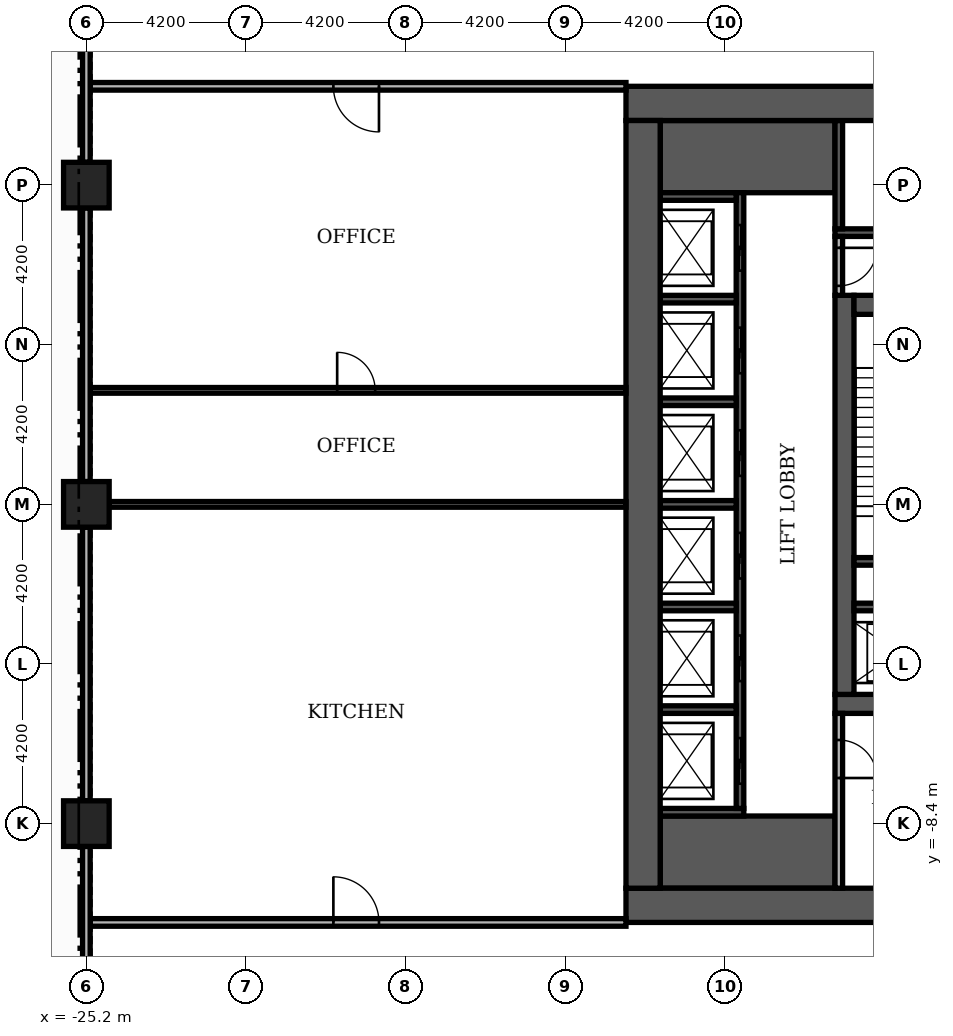
"""IFC4 building model, lengths in metres.
Left out: names, types, materials, properties, quantities, classifications, styles, units other than length and angle.
Written with IfcOpenShell. Run it as: python <this file> out.ifc"""

import sys

from ifc_helpers import new_model, si_unit, direction, frame, frame_2d, origin, origin_2d, place, context, subcontext, project, spatial, rectangle, extrude, element, fill, save


model = new_model("IFC4")
c1 = context("Model", 3, precision=1e-05, world=origin(), true_north=direction((0.0, 1.0)))
c2 = subcontext(c1, "Body", "Model", "MODEL_VIEW")
j1 = project(units=[si_unit("LENGTHUNIT", "METRE"), si_unit("PLANEANGLEUNIT", "RADIAN")], contexts=[c1])
p1 = place(None, origin())
s1 = spatial("IfcSite", under=j1, at=p1, CompositionType="ELEMENT")
p2 = place(p1, origin())
s2 = spatial("IfcBuilding", under=s1, at=p2, CompositionType="ELEMENT")
p3 = place(p2, frame((0.0, 0.0, 16.8)))
s3 = spatial("IfcBuildingStorey", under=s2, at=p3, CompositionType="ELEMENT", Elevation=16.8)
p4 = place(p3, frame((-5.5, -5.25, 0.0), z_axis=(0.0, 0.0, 1.0), x_axis=(1.0, 0.0, 0.0)))
e1 = element("IfcWall", 1, at=p4, inside=s3, PredefinedType="SHEAR", context=c2, shape_type="SweptSolid", body=[
    extrude(rectangle(XDim=11.0, YDim=0.5, at=frame_2d((5.5, 0.0))), origin(), (0.0, 0.0, 1.0), 4.98),
])
p5 = place(p4, frame((4.9, 0.0, 0.0)))
e2 = element("IfcOpeningElement", 2, at=p5, cuts=e1, PredefinedType="OPENING", context=c2, shape_type="SweptSolid", body=[
    extrude(rectangle(XDim=1.2, YDim=2.1, at=frame_2d((0.6, 1.05))), frame((0.0, 0.26, 0.0), z_axis=(0.0, -1.0, 0.0), x_axis=(1.0, 0.0, 0.0)), (0.0, 0.0, 1.0), 0.52),
])
p6 = place(p3, frame((-5.25, -5.0, 0.0), z_axis=(0.0, 0.0, 1.0), x_axis=(0.0, 1.0, 0.0)))
e3 = element("IfcWall", 3, at=p6, inside=s3, PredefinedType="SHEAR", context=c2, shape_type="SweptSolid", body=[
    extrude(rectangle(XDim=10.5, YDim=0.5, at=frame_2d((5.25, 0.0))), origin(), (0.0, 0.0, 1.0), 4.98),
])
p7 = place(p3, frame((-5.0, 5.25, 0.0), z_axis=(0.0, 0.0, 1.0), x_axis=(1.0, 0.0, 0.0)))
e4 = element("IfcWall", 4, at=p7, inside=s3, PredefinedType="SHEAR", context=c2, shape_type="SweptSolid", body=[
    extrude(rectangle(XDim=10.0, YDim=0.5, at=frame_2d((5.0, 0.0))), origin(), (0.0, 0.0, 1.0), 4.98),
])
p8 = place(p7, frame((4.4, 0.0, 0.0)))
e5 = element("IfcOpeningElement", 5, at=p8, cuts=e4, PredefinedType="OPENING", context=c2, shape_type="SweptSolid", body=[
    extrude(rectangle(XDim=1.2, YDim=2.1, at=frame_2d((0.6, 1.05))), frame((0.0, 0.26, 0.0), z_axis=(0.0, -1.0, 0.0), x_axis=(1.0, 0.0, 0.0)), (0.0, 0.0, 1.0), 0.52),
])
for number, where, z_axis, x_axis in (
    (6, (-10.1, -9.15, 0.0), (0.0, 0.0, 1.0), (1.0, 0.0, 0.0)),
    (7, (-10.1, 9.15, 0.0), (0.0, 0.0, 1.0), (1.0, 0.0, 0.0)),
):
    element("IfcWall", number, at=place(p3, frame(where, z_axis=z_axis, x_axis=x_axis)), inside=s3, PredefinedType="SHEAR", context=c2, shape_type="SweptSolid", body=[
        extrude(rectangle(XDim=4.6, YDim=1.9, at=frame_2d((2.3, 0.0))), origin(), (0.0, 0.0, 1.0), 4.98),
    ])
p9 = place(p3, frame((-5.0, -1.5, 0.0), z_axis=(0.0, 0.0, 1.0), x_axis=(1.0, 0.0, 0.0)))
e8 = element("IfcWall", 8, at=p9, inside=s3, PredefinedType="SHEAR", context=c2, shape_type="SweptSolid", body=[
    extrude(rectangle(XDim=3.05, YDim=0.2, at=frame_2d((1.525, 0.0))), origin(), (0.0, 0.0, 1.0), 4.98),
])
p10 = place(p3, frame((-5.5, 7.15, 0.0), z_axis=(0.0, 0.0, 1.0), x_axis=(1.0, 0.0, 0.0)))
e9 = element("IfcWall", 9, at=p10, inside=s3, PredefinedType="SHEAR", context=c2, shape_type="SweptSolid", body=[
    extrude(rectangle(XDim=6.8, YDim=0.2, at=frame_2d((3.4, 0.0))), origin(), (0.0, 0.0, 1.0), 4.98),
])
p11 = place(p3, frame((-5.4, 7.25, 0.0), z_axis=(0.0, 0.0, 1.0), x_axis=(0.0, 1.0, 0.0)))
e10 = element("IfcWall", 10, at=p11, inside=s3, PredefinedType="SHEAR", context=c2, shape_type="SweptSolid", body=[
    extrude(rectangle(XDim=2.85, YDim=0.2, at=frame_2d((1.425, 0.0))), origin(), (0.0, 0.0, 1.0), 4.98),
])
p12 = place(p3, frame((-10.1, -8.1, 0.0), z_axis=(0.0, 0.0, 1.0), x_axis=(1.0, 0.0, 0.0)))
e11 = element("IfcWall", 11, at=p12, inside=s3, PredefinedType="SHEAR", context=c2, shape_type="SweptSolid", body=[
    extrude(rectangle(XDim=2.2, YDim=0.2, at=frame_2d((1.1, 0.0))), origin(), (0.0, 0.0, 1.0), 4.98),
])
p13 = place(p3, frame((-8.0, -8.0, 0.0), z_axis=(0.0, 0.0, 1.0), x_axis=(0.0, 1.0, 0.0)))
e12 = element("IfcWall", 12, at=p13, inside=s3, PredefinedType="SHEAR", context=c2, shape_type="SweptSolid", body=[
    extrude(rectangle(XDim=16.2, YDim=0.2, at=frame_2d((8.1, 0.0))), origin(), (0.0, 0.0, 1.0), 4.98),
])
p14 = place(p13, frame((0.65, 0.0, 0.0)))
e13 = element("IfcOpeningElement", 13, at=p14, cuts=e12, PredefinedType="OPENING", context=c2, shape_type="SweptSolid", body=[
    extrude(rectangle(XDim=1.2, YDim=2.1, at=frame_2d((0.6, 1.05))), frame((0.0, 0.11, 0.0), z_axis=(0.0, -1.0, 0.0), x_axis=(1.0, 0.0, 0.0)), (0.0, 0.0, 1.0), 0.22),
])
p15 = place(p13, frame((3.35, 0.0, 0.0)))
e14 = element("IfcOpeningElement", 14, at=p15, cuts=e12, PredefinedType="OPENING", context=c2, shape_type="SweptSolid", body=[
    extrude(rectangle(XDim=1.2, YDim=2.1, at=frame_2d((0.6, 1.05))), frame((0.0, 0.11, 0.0), z_axis=(0.0, -1.0, 0.0), x_axis=(1.0, 0.0, 0.0)), (0.0, 0.0, 1.0), 0.22),
])
p16 = place(p13, frame((6.05, 0.0, 0.0)))
e15 = element("IfcOpeningElement", 15, at=p16, cuts=e12, PredefinedType="OPENING", context=c2, shape_type="SweptSolid", body=[
    extrude(rectangle(XDim=1.2, YDim=2.1, at=frame_2d((0.6, 1.05))), frame((0.0, 0.11, 0.0), z_axis=(0.0, -1.0, 0.0), x_axis=(1.0, 0.0, 0.0)), (0.0, 0.0, 1.0), 0.22),
])
p17 = place(p13, frame((8.75, 0.0, 0.0)))
e16 = element("IfcOpeningElement", 16, at=p17, cuts=e12, PredefinedType="OPENING", context=c2, shape_type="SweptSolid", body=[
    extrude(rectangle(XDim=1.2, YDim=2.1, at=frame_2d((0.6, 1.05))), frame((0.0, 0.11, 0.0), z_axis=(0.0, -1.0, 0.0), x_axis=(1.0, 0.0, 0.0)), (0.0, 0.0, 1.0), 0.22),
])
p18 = place(p13, frame((11.45, 0.0, 0.0)))
e17 = element("IfcOpeningElement", 17, at=p18, cuts=e12, PredefinedType="OPENING", context=c2, shape_type="SweptSolid", body=[
    extrude(rectangle(XDim=1.2, YDim=2.1, at=frame_2d((0.6, 1.05))), frame((0.0, 0.11, 0.0), z_axis=(0.0, -1.0, 0.0), x_axis=(1.0, 0.0, 0.0)), (0.0, 0.0, 1.0), 0.22),
])
p19 = place(p13, frame((14.15, 0.0, 0.0)))
e18 = element("IfcOpeningElement", 18, at=p19, cuts=e12, PredefinedType="OPENING", context=c2, shape_type="SweptSolid", body=[
    extrude(rectangle(XDim=1.2, YDim=2.1, at=frame_2d((0.6, 1.05))), frame((0.0, 0.11, 0.0), z_axis=(0.0, -1.0, 0.0), x_axis=(1.0, 0.0, 0.0)), (0.0, 0.0, 1.0), 0.22),
])
for number, where, z_axis, x_axis in (
    (19, (-10.1, -5.4, 0.0), (0.0, 0.0, 1.0), (1.0, 0.0, 0.0)),
    (20, (-10.1, -2.7, 0.0), (0.0, 0.0, 1.0), (1.0, 0.0, 0.0)),
):
    element("IfcWall", number, at=place(p3, frame(where, z_axis=z_axis, x_axis=x_axis)), inside=s3, PredefinedType="SHEAR", context=c2, shape_type="SweptSolid", body=[
        extrude(rectangle(XDim=2.0, YDim=0.2, at=frame_2d((1.0, 0.0))), origin(), (0.0, 0.0, 1.0), 4.98),
    ])
p20 = place(p3, frame((-5.0, -2.7, 0.0), z_axis=(0.0, 0.0, 1.0), x_axis=(1.0, 0.0, 0.0)))
e21 = element("IfcWall", 21, at=p20, inside=s3, PredefinedType="SHEAR", context=c2, shape_type="SweptSolid", body=[
    extrude(rectangle(XDim=2.85, YDim=0.2, at=frame_2d((1.425, 0.0))), origin(), (0.0, 0.0, 1.0), 4.98),
])
for number, where, z_axis, x_axis in (
    (22, (-10.1, 0.0, 0.0), (0.0, 0.0, 1.0), (1.0, 0.0, 0.0)),
    (23, (-10.1, 2.7, 0.0), (0.0, 0.0, 1.0), (1.0, 0.0, 0.0)),
    (24, (-10.1, 5.4, 0.0), (0.0, 0.0, 1.0), (1.0, 0.0, 0.0)),
    (25, (-10.1, 8.1, 0.0), (0.0, 0.0, 1.0), (1.0, 0.0, 0.0)),
):
    element("IfcWall", number, at=place(p3, frame(where, z_axis=z_axis, x_axis=x_axis)), inside=s3, PredefinedType="SHEAR", context=c2, shape_type="SweptSolid", body=[
        extrude(rectangle(XDim=2.0, YDim=0.2, at=frame_2d((1.0, 0.0))), origin(), (0.0, 0.0, 1.0), 4.98),
    ])
p21 = place(p3, frame((-11.0, -10.55, 0.0), z_axis=(0.0, 0.0, 1.0), x_axis=(1.0, 0.0, 0.0)))
e26 = element("IfcWall", 26, at=p21, inside=s3, PredefinedType="SHEAR", context=c2, shape_type="SweptSolid", body=[
    extrude(rectangle(XDim=22.0, YDim=0.9, at=frame_2d((11.0, 0.0))), origin(), (0.0, 0.0, 1.0), 4.98),
])
p22 = place(p21, frame((7.4, 0.0, 0.0)))
e27 = element("IfcOpeningElement", 27, at=p22, cuts=e26, PredefinedType="OPENING", context=c2, shape_type="SweptSolid", body=[
    extrude(rectangle(XDim=1.8, YDim=2.2, at=frame_2d((0.9, 1.1))), frame((0.0, 0.46, 0.0), z_axis=(0.0, -1.0, 0.0), x_axis=(1.0, 0.0, 0.0)), (0.0, 0.0, 1.0), 0.92),
])
p23 = place(p3, frame((-11.0, 10.55, 0.0), z_axis=(0.0, 0.0, 1.0), x_axis=(1.0, 0.0, 0.0)))
e28 = element("IfcWall", 28, at=p23, inside=s3, PredefinedType="SHEAR", context=c2, shape_type="SweptSolid", body=[
    extrude(rectangle(XDim=22.0, YDim=0.9, at=frame_2d((11.0, 0.0))), origin(), (0.0, 0.0, 1.0), 4.98),
])
p24 = place(p23, frame((13.3, 0.0, 0.0)))
e29 = element("IfcOpeningElement", 29, at=p24, cuts=e28, PredefinedType="OPENING", context=c2, shape_type="SweptSolid", body=[
    extrude(rectangle(XDim=1.8, YDim=2.2, at=frame_2d((0.9, 1.1))), frame((0.0, 0.46, 0.0), z_axis=(0.0, -1.0, 0.0), x_axis=(1.0, 0.0, 0.0)), (0.0, 0.0, 1.0), 0.92),
])
p25 = place(p3, frame((-10.55, -10.1, 0.0), z_axis=(0.0, 0.0, 1.0), x_axis=(0.0, 1.0, 0.0)))
e30 = element("IfcWall", 30, at=p25, inside=s3, PredefinedType="SHEAR", context=c2, shape_type="SweptSolid", body=[
    extrude(rectangle(XDim=20.2, YDim=0.9, at=frame_2d((10.1, 0.0))), origin(), (0.0, 0.0, 1.0), 4.98),
])
for number, where, z_axis, x_axis in (
    (31, (-25.2, 0.0, 0.0), (0.0, 0.0, 1.0), (1.0, 0.0, 0.0)),
    (32, (-25.2, -8.4, 0.0), (0.0, 0.0, 1.0), (1.0, 0.0, 0.0)),
    (33, (-25.2, 8.4, 0.0), (0.0, 0.0, 1.0), (1.0, 0.0, 0.0)),
):
    element("IfcColumn", number, at=place(p3, frame(where, z_axis=z_axis, x_axis=x_axis)), inside=s3, PredefinedType="COLUMN", context=c2, shape_type="SweptSolid", body=[
        extrude(rectangle(XDim=1.2, YDim=1.2, at=origin_2d()), origin(), (0.0, 0.0, 1.0), 5.4),
    ])
p26 = place(p3, frame((-5.4, -10.1, 0.0), z_axis=(0.0, 0.0, 1.0), x_axis=(0.0, 1.0, 0.0)))
e34 = element("IfcWall", 34, at=p26, inside=s3, PredefinedType="PARTITIONING", context=c2, shape_type="SweptSolid", body=[
    extrude(rectangle(XDim=4.6, YDim=0.2, at=frame_2d((2.3, 0.0))), origin(), (0.0, 0.0, 1.0), 4.98),
])
p27 = place(p26, frame((2.9, 0.0, 0.0)))
e35 = element("IfcOpeningElement", 35, at=p27, cuts=e34, PredefinedType="OPENING", context=c2, shape_type="SweptSolid", body=[
    extrude(rectangle(XDim=1.0, YDim=2.1, at=frame_2d((0.5, 1.05))), frame((0.0, 0.11, 0.0), z_axis=(0.0, -1.0, 0.0), x_axis=(1.0, 0.0, 0.0)), (0.0, 0.0, 1.0), 0.22),
])
p28 = place(p3, frame((-5.4, 5.5, 0.0), z_axis=(0.0, 0.0, 1.0), x_axis=(0.0, 1.0, 0.0)))
e36 = element("IfcWall", 36, at=p28, inside=s3, PredefinedType="PARTITIONING", context=c2, shape_type="SweptSolid", body=[
    extrude(rectangle(XDim=1.55, YDim=0.2, at=frame_2d((0.775, 0.0))), origin(), (0.0, 0.0, 1.0), 4.98),
])
p29 = place(p28, frame((0.25, 0.0, 0.0)))
e37 = element("IfcOpeningElement", 37, at=p29, cuts=e36, PredefinedType="OPENING", context=c2, shape_type="SweptSolid", body=[
    extrude(rectangle(XDim=1.0, YDim=2.1, at=frame_2d((0.5, 1.05))), frame((0.0, 0.11, 0.0), z_axis=(0.0, -1.0, 0.0), x_axis=(1.0, 0.0, 0.0)), (0.0, 0.0, 1.0), 0.22),
])
p30 = place(p3, frame((-25.1, -11.0, 0.0), z_axis=(0.0, 0.0, 1.0), x_axis=(1.0, 0.0, 0.0)))
e38 = element("IfcWall", 38, at=p30, inside=s3, PredefinedType="PARTITIONING", context=c2, shape_type="SweptSolid", body=[
    extrude(rectangle(XDim=14.1, YDim=0.2, at=frame_2d((7.05, 0.0))), origin(), (0.0, 0.0, 1.0), 4.98),
])
p31 = place(p30, frame((6.4, 0.0, 0.0)))
e39 = element("IfcOpeningElement", 39, at=p31, cuts=e38, PredefinedType="OPENING", context=c2, shape_type="SweptSolid", body=[
    extrude(rectangle(XDim=1.2, YDim=2.2, at=frame_2d((0.6, 1.1))), frame((0.0, 0.11, 0.0), z_axis=(0.0, -1.0, 0.0), x_axis=(1.0, 0.0, 0.0)), (0.0, 0.0, 1.0), 0.22),
])
p32 = place(p3, frame((-24.6, 0.0, 0.0), z_axis=(0.0, 0.0, 1.0), x_axis=(1.0, 0.0, 0.0)))
e40 = element("IfcWall", 40, at=p32, inside=s3, PredefinedType="PARTITIONING", context=c2, shape_type="SweptSolid", body=[
    extrude(rectangle(XDim=13.6, YDim=0.15, at=frame_2d((6.8, 0.0))), origin(), (0.0, 0.0, 1.0), 4.98),
])
p33 = place(p3, frame((-25.1, 3.0, 0.0), z_axis=(0.0, 0.0, 1.0), x_axis=(1.0, 0.0, 0.0)))
e41 = element("IfcWall", 41, at=p33, inside=s3, PredefinedType="PARTITIONING", context=c2, shape_type="SweptSolid", body=[
    extrude(rectangle(XDim=14.1, YDim=0.15, at=frame_2d((7.05, 0.0))), origin(), (0.0, 0.0, 1.0), 4.98),
])
p34 = place(p33, frame((6.5, 0.0, 0.0)))
e42 = element("IfcOpeningElement", 42, at=p34, cuts=e41, PredefinedType="OPENING", context=c2, shape_type="SweptSolid", body=[
    extrude(rectangle(XDim=1.0, YDim=2.1, at=frame_2d((0.5, 1.05))), frame((0.0, 0.085, 0.0), z_axis=(0.0, -1.0, 0.0), x_axis=(1.0, 0.0, 0.0)), (0.0, 0.0, 1.0), 0.17),
])
p35 = place(p3, frame((-25.1, 11.0, 0.0), z_axis=(0.0, 0.0, 1.0), x_axis=(1.0, 0.0, 0.0)))
e43 = element("IfcWall", 43, at=p35, inside=s3, PredefinedType="PARTITIONING", context=c2, shape_type="SweptSolid", body=[
    extrude(rectangle(XDim=14.1, YDim=0.2, at=frame_2d((7.05, 0.0))), origin(), (0.0, 0.0, 1.0), 4.98),
])
p36 = place(p35, frame((6.4, 0.0, 0.0)))
e44 = element("IfcOpeningElement", 44, at=p36, cuts=e43, PredefinedType="OPENING", context=c2, shape_type="SweptSolid", body=[
    extrude(rectangle(XDim=1.2, YDim=2.2, at=frame_2d((0.6, 1.1))), frame((0.0, 0.11, 0.0), z_axis=(0.0, -1.0, 0.0), x_axis=(1.0, 0.0, 0.0)), (0.0, 0.0, 1.0), 0.22),
])
p37 = place(p3, frame((-25.2, -16.2, 0.0), z_axis=(0.0, 0.0, 1.0), x_axis=(0.0, 1.0, 0.0)))
e45 = element("IfcWall", 45, at=p37, inside=s3, PredefinedType="PARTITIONING", context=c2, shape_type="SweptSolid", body=[
    extrude(rectangle(XDim=7.2, YDim=0.2, at=frame_2d((3.6, 0.0))), origin(), (0.0, 0.0, 1.0), 4.68),
])
p38 = place(p37, frame((1.5, 0.0, 0.0)))
e46 = element("IfcOpeningElement", 46, at=p38, cuts=e45, PredefinedType="OPENING", context=c2, shape_type="SweptSolid", body=[
    extrude(rectangle(XDim=1.8, YDim=2.2, at=frame_2d((0.9, 1.1))), frame((0.0, 0.11, 0.0), z_axis=(0.0, -1.0, 0.0), x_axis=(1.0, 0.0, 0.0)), (0.0, 0.0, 1.0), 0.22),
])
for number, where, z_axis, x_axis in (
    (47, (-25.2, -7.8, 0.0), (0.0, 0.0, 1.0), (0.0, 1.0, 0.0)),
    (48, (-25.2, 0.6, 0.0), (0.0, 0.0, 1.0), (0.0, 1.0, 0.0)),
):
    element("IfcWall", number, at=place(p3, frame(where, z_axis=z_axis, x_axis=x_axis)), inside=s3, PredefinedType="PARTITIONING", context=c2, shape_type="SweptSolid", body=[
        extrude(rectangle(XDim=7.2, YDim=0.2, at=frame_2d((3.6, 0.0))), origin(), (0.0, 0.0, 1.0), 4.68),
    ])
p39 = place(p3, frame((-25.2, 9.0, 0.0), z_axis=(0.0, 0.0, 1.0), x_axis=(0.0, 1.0, 0.0)))
e49 = element("IfcWall", 49, at=p39, inside=s3, PredefinedType="PARTITIONING", context=c2, shape_type="SweptSolid", body=[
    extrude(rectangle(XDim=7.2, YDim=0.2, at=frame_2d((3.6, 0.0))), origin(), (0.0, 0.0, 1.0), 4.68),
])
p40 = place(p39, frame((3.9, 0.0, 0.0)))
e50 = element("IfcOpeningElement", 50, at=p40, cuts=e49, PredefinedType="OPENING", context=c2, shape_type="SweptSolid", body=[
    extrude(rectangle(XDim=1.8, YDim=2.2, at=frame_2d((0.9, 1.1))), frame((0.0, 0.11, 0.0), z_axis=(0.0, -1.0, 0.0), x_axis=(1.0, 0.0, 0.0)), (0.0, 0.0, 1.0), 0.22),
])
p41 = place(p14, origin())
e51 = element("IfcDoor", 51, at=p41, inside=s3, OperationType="SLIDING_TO_LEFT", PredefinedType="DOOR", context=c2, shape_type="SweptSolid", body=[
    extrude(rectangle(XDim=1.2, YDim=2.1, at=frame_2d((0.6, 1.05))), frame((0.0, 0.025, 0.0), z_axis=(0.0, -1.0, 0.0), x_axis=(1.0, 0.0, 0.0)), (0.0, 0.0, 1.0), 0.05),
])
fill(e13, e51)
p42 = place(p15, origin())
e52 = element("IfcDoor", 52, at=p42, inside=s3, OperationType="SLIDING_TO_LEFT", PredefinedType="DOOR", context=c2, shape_type="SweptSolid", body=[
    extrude(rectangle(XDim=1.2, YDim=2.1, at=frame_2d((0.6, 1.05))), frame((0.0, 0.025, 0.0), z_axis=(0.0, -1.0, 0.0), x_axis=(1.0, 0.0, 0.0)), (0.0, 0.0, 1.0), 0.05),
])
fill(e14, e52)
p43 = place(p16, origin())
e53 = element("IfcDoor", 53, at=p43, inside=s3, OperationType="SLIDING_TO_LEFT", PredefinedType="DOOR", context=c2, shape_type="SweptSolid", body=[
    extrude(rectangle(XDim=1.2, YDim=2.1, at=frame_2d((0.6, 1.05))), frame((0.0, 0.025, 0.0), z_axis=(0.0, -1.0, 0.0), x_axis=(1.0, 0.0, 0.0)), (0.0, 0.0, 1.0), 0.05),
])
fill(e15, e53)
p44 = place(p17, origin())
e54 = element("IfcDoor", 54, at=p44, inside=s3, OperationType="SLIDING_TO_LEFT", PredefinedType="DOOR", context=c2, shape_type="SweptSolid", body=[
    extrude(rectangle(XDim=1.2, YDim=2.1, at=frame_2d((0.6, 1.05))), frame((0.0, 0.025, 0.0), z_axis=(0.0, -1.0, 0.0), x_axis=(1.0, 0.0, 0.0)), (0.0, 0.0, 1.0), 0.05),
])
fill(e16, e54)
p45 = place(p18, origin())
e55 = element("IfcDoor", 55, at=p45, inside=s3, OperationType="SLIDING_TO_LEFT", PredefinedType="DOOR", context=c2, shape_type="SweptSolid", body=[
    extrude(rectangle(XDim=1.2, YDim=2.1, at=frame_2d((0.6, 1.05))), frame((0.0, 0.025, 0.0), z_axis=(0.0, -1.0, 0.0), x_axis=(1.0, 0.0, 0.0)), (0.0, 0.0, 1.0), 0.05),
])
fill(e17, e55)
p46 = place(p19, origin())
e56 = element("IfcDoor", 56, at=p46, inside=s3, OperationType="SLIDING_TO_LEFT", PredefinedType="DOOR", context=c2, shape_type="SweptSolid", body=[
    extrude(rectangle(XDim=1.2, YDim=2.1, at=frame_2d((0.6, 1.05))), frame((0.0, 0.025, 0.0), z_axis=(0.0, -1.0, 0.0), x_axis=(1.0, 0.0, 0.0)), (0.0, 0.0, 1.0), 0.05),
])
fill(e18, e56)
p47 = place(p29, frame((1.0, 0.0, 0.0), z_axis=(0.0, 0.0, 1.0), x_axis=(-1.0, 0.0, 0.0)))
e57 = element("IfcDoor", 57, at=p47, inside=s3, OperationType="SINGLE_SWING_RIGHT", PredefinedType="DOOR", context=c2, shape_type="SweptSolid", body=[
    extrude(rectangle(XDim=1.0, YDim=2.1, at=frame_2d((0.5, 1.05))), frame((0.0, 0.025, 0.0), z_axis=(0.0, -1.0, 0.0), x_axis=(1.0, 0.0, 0.0)), (0.0, 0.0, 1.0), 0.05),
])
fill(e37, e57)
p48 = place(p27, frame((1.0, 0.0, 0.0), z_axis=(0.0, 0.0, 1.0), x_axis=(-1.0, 0.0, 0.0)))
e58 = element("IfcDoor", 58, at=p48, inside=s3, OperationType="SINGLE_SWING_LEFT", PredefinedType="DOOR", context=c2, shape_type="SweptSolid", body=[
    extrude(rectangle(XDim=1.0, YDim=2.1, at=frame_2d((0.5, 1.05))), frame((0.0, 0.025, 0.0), z_axis=(0.0, -1.0, 0.0), x_axis=(1.0, 0.0, 0.0)), (0.0, 0.0, 1.0), 0.05),
])
fill(e35, e58)
p49 = place(p31, origin())
e59 = element("IfcDoor", 59, at=p49, inside=s3, OperationType="SINGLE_SWING_LEFT", PredefinedType="DOOR", context=c2, shape_type="SweptSolid", body=[
    extrude(rectangle(XDim=1.2, YDim=2.2, at=frame_2d((0.6, 1.1))), frame((0.0, 0.025, 0.0), z_axis=(0.0, -1.0, 0.0), x_axis=(1.0, 0.0, 0.0)), (0.0, 0.0, 1.0), 0.05),
])
fill(e39, e59)
p50 = place(p34, origin())
e60 = element("IfcDoor", 60, at=p50, inside=s3, OperationType="SINGLE_SWING_LEFT", PredefinedType="DOOR", context=c2, shape_type="SweptSolid", body=[
    extrude(rectangle(XDim=1.0, YDim=2.1, at=frame_2d((0.5, 1.05))), frame((0.0, 0.025, 0.0), z_axis=(0.0, -1.0, 0.0), x_axis=(1.0, 0.0, 0.0)), (0.0, 0.0, 1.0), 0.05),
])
fill(e42, e60)
p51 = place(p36, origin())
e61 = element("IfcDoor", 61, at=p51, inside=s3, OperationType="SINGLE_SWING_RIGHT", PredefinedType="DOOR", context=c2, shape_type="SweptSolid", body=[
    extrude(rectangle(XDim=1.2, YDim=2.2, at=frame_2d((0.6, 1.1))), frame((0.0, 0.025, 0.0), z_axis=(0.0, -1.0, 0.0), x_axis=(1.0, 0.0, 0.0)), (0.0, 0.0, 1.0), 0.05),
])
fill(e44, e61)
save(model, sys.argv[1])
